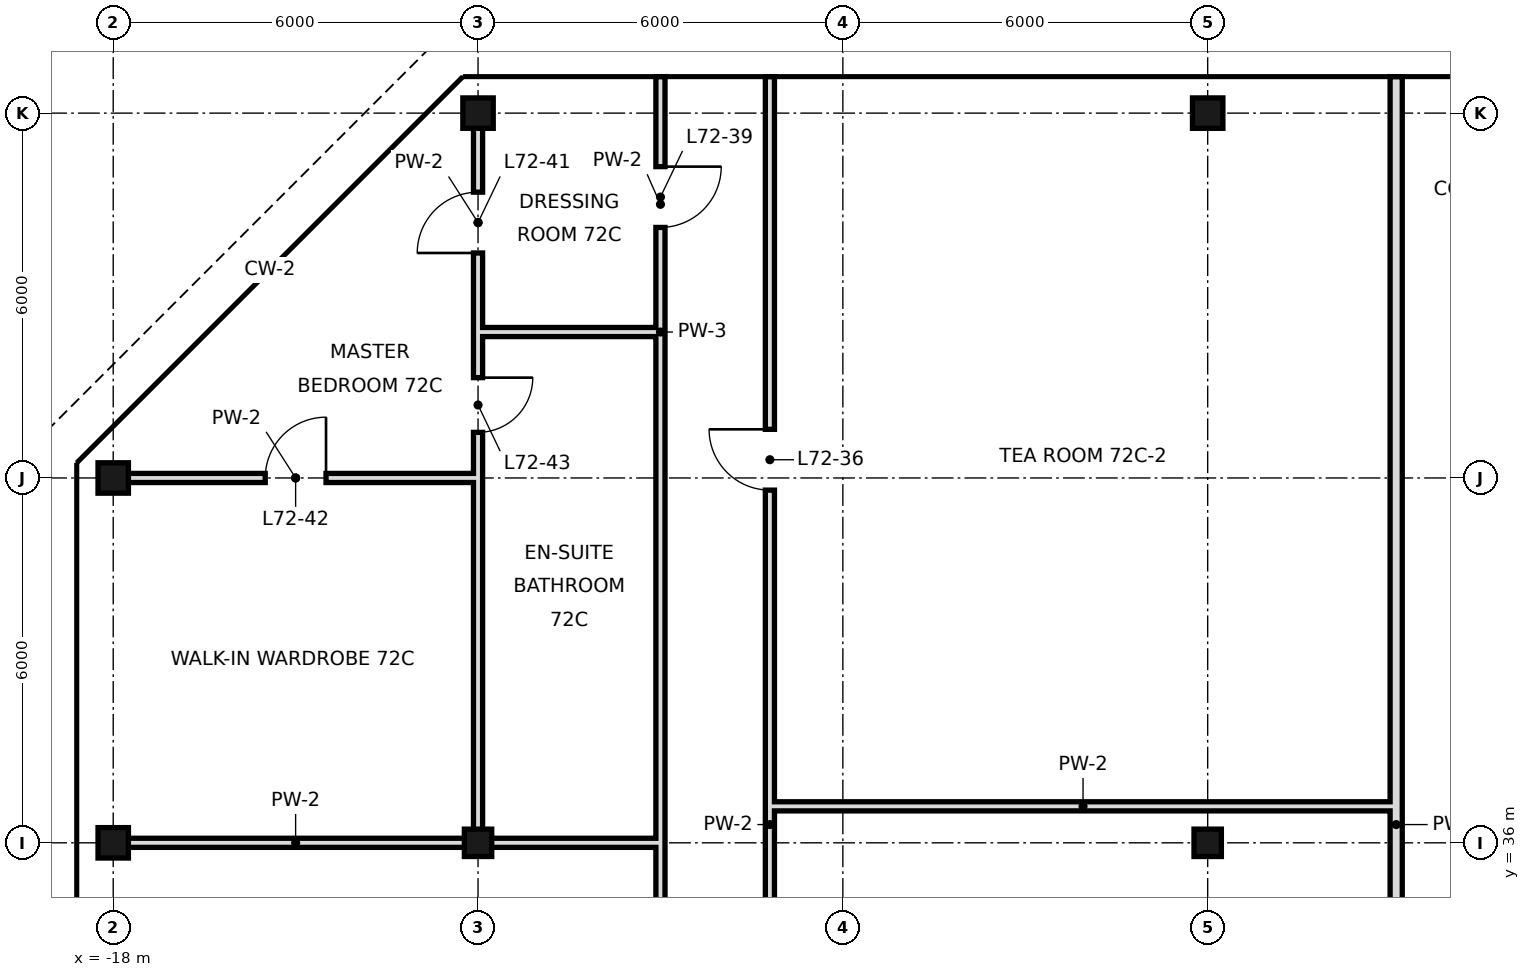
"""IFC4 building model, lengths in metres.
Left out: names, types, materials, properties, quantities, classifications, styles, units other than length and angle.
Written with IfcOpenShell. Run it as: python <this file> out.ifc"""

import sys

from ifc_helpers import new_model, si_unit, direction, frame, frame_2d, origin, origin_2d, place, context, subcontext, project, spatial, rectangle, hollow_rectangle, extrude, element, fill, save


model = new_model("IFC4")
c1 = context("Model", 3, precision=1e-05, world=origin(), true_north=direction((0.0, 1.0)))
c2 = subcontext(c1, "Body", "Model", "MODEL_VIEW")
j1 = project(units=[si_unit("LENGTHUNIT", "METRE"), si_unit("PLANEANGLEUNIT", "RADIAN")], contexts=[c1])
p1 = place(None, origin())
s1 = spatial("IfcSite", under=j1, at=p1, CompositionType="ELEMENT")
p2 = place(p1, origin())
s2 = spatial("IfcBuilding", under=s1, at=p2, CompositionType="ELEMENT")
p3 = place(p2, frame((0.0, 0.0, 305.2)))
s3 = spatial("IfcBuildingStorey", under=s2, at=p3, CompositionType="ELEMENT", Elevation=305.2)
for number, where, z_axis, x_axis in (
    (1, (-18.0, 36.0, 0.0), (0.0, 0.0, 1.0), (1.0, 0.0, 0.0)),
    (2, (-18.0, 42.0, 0.0), (0.0, 0.0, 1.0), (1.0, 0.0, 0.0)),
):
    element("IfcColumn", number, at=place(p3, frame(where, z_axis=z_axis, x_axis=x_axis)), inside=s3, PredefinedType="COLUMN", context=c2, shape_type="SweptSolid", body=[
        extrude(hollow_rectangle(XDim=0.5, YDim=0.5, WallThickness=0.025, at=origin_2d()), origin(), (0.0, 0.0, 1.0), 3.6),
    ])
p4 = place(p3, frame((-12.0, 36.0, 0.0), z_axis=(0.0, 0.0, 1.0), x_axis=(1.0, 0.0, 0.0)))
e3 = element("IfcColumn", 3, at=p4, inside=s3, PredefinedType="COLUMN", context=c2, shape_type="SweptSolid", body=[
    extrude(hollow_rectangle(XDim=0.45, YDim=0.45, WallThickness=0.022, at=origin_2d()), origin(), (0.0, 0.0, 1.0), 3.6),
])
p5 = place(p3, frame((-12.0, 48.0, 0.0), z_axis=(0.0, 0.0, 1.0), x_axis=(1.0, 0.0, 0.0)))
e4 = element("IfcColumn", 4, at=p5, inside=s3, PredefinedType="COLUMN", context=c2, shape_type="SweptSolid", body=[
    extrude(hollow_rectangle(XDim=0.5, YDim=0.5, WallThickness=0.025, at=origin_2d()), origin(), (0.0, 0.0, 1.0), 3.6),
])
p6 = place(p3, frame((0.0, 36.0, 0.0), z_axis=(0.0, 0.0, 1.0), x_axis=(1.0, 0.0, 0.0)))
e5 = element("IfcColumn", 5, at=p6, inside=s3, PredefinedType="COLUMN", context=c2, shape_type="SweptSolid", body=[
    extrude(hollow_rectangle(XDim=0.45, YDim=0.45, WallThickness=0.022, at=origin_2d()), origin(), (0.0, 0.0, 1.0), 3.6),
])
p7 = place(p3, frame((0.0, 48.0, 0.0), z_axis=(0.0, 0.0, 1.0), x_axis=(1.0, 0.0, 0.0)))
e6 = element("IfcColumn", 6, at=p7, inside=s3, PredefinedType="COLUMN", context=c2, shape_type="SweptSolid", body=[
    extrude(hollow_rectangle(XDim=0.5, YDim=0.5, WallThickness=0.025, at=origin_2d()), origin(), (0.0, 0.0, 1.0), 3.6),
])
p8 = place(p3, frame((-12.0, 44.4, 0.0), z_axis=(0.0, 0.0, 1.0), x_axis=(0.0, 1.0, 0.0)))
e7 = element("IfcWall", 7, at=p8, inside=s3, PredefinedType="PARTITIONING", context=c2, shape_type="SweptSolid", body=[
    extrude(rectangle(XDim=3.6, YDim=0.15, at=frame_2d((1.8, 0.0))), origin(), (0.0, 0.0, 1.0), 2.72),
])
p9 = place(p8, frame((1.3, 0.0, 0.0)))
e8 = element("IfcOpeningElement", 8, at=p9, cuts=e7, PredefinedType="OPENING", context=c2, shape_type="SweptSolid", body=[
    extrude(rectangle(XDim=1.0, YDim=2.4, at=frame_2d((0.5, 1.2))), frame((0.0, 0.085, 0.0), z_axis=(0.0, -1.0, 0.0), x_axis=(1.0, 0.0, 0.0)), (0.0, 0.0, 1.0), 0.17),
])
p10 = place(p3, frame((-12.0, 36.0, 0.0), z_axis=(0.0, 0.0, 1.0), x_axis=(0.0, 1.0, 0.0)))
e9 = element("IfcWall", 9, at=p10, inside=s3, PredefinedType="PARTITIONING", context=c2, shape_type="SweptSolid", body=[
    extrude(rectangle(XDim=8.4, YDim=0.15, at=frame_2d((4.2, 0.0))), origin(), (0.0, 0.0, 1.0), 2.72),
])
p11 = place(p10, frame((6.75, 0.0, 0.0)))
e10 = element("IfcOpeningElement", 10, at=p11, cuts=e9, PredefinedType="OPENING", context=c2, shape_type="SweptSolid", body=[
    extrude(rectangle(XDim=0.9, YDim=2.4, at=frame_2d((0.45, 1.2))), frame((0.0, 0.085, 0.0), z_axis=(0.0, -1.0, 0.0), x_axis=(1.0, 0.0, 0.0)), (0.0, 0.0, 1.0), 0.17),
])
p12 = place(p3, frame((-7.2, 24.0, 0.0), z_axis=(0.0, 0.0, 1.0), x_axis=(0.0, 1.0, 0.0)))
e11 = element("IfcWall", 11, at=p12, inside=s3, PredefinedType="PARTITIONING", context=c2, shape_type="SweptSolid", body=[
    extrude(rectangle(XDim=24.6, YDim=0.15, at=frame_2d((12.3, 0.0))), origin(), (0.0, 0.0, 1.0), 3.42),
])
p13 = place(p12, frame((1.3, 0.0, 0.0)))
e12 = element("IfcOpeningElement", 12, at=p13, cuts=e11, PredefinedType="OPENING", context=c2, shape_type="SweptSolid", body=[
    extrude(rectangle(XDim=1.0, YDim=2.4, at=frame_2d((0.5, 1.2))), frame((0.0, 0.085, 0.0), z_axis=(0.0, -1.0, 0.0), x_axis=(1.0, 0.0, 0.0)), (0.0, 0.0, 1.0), 0.17),
])
p14 = place(p12, frame((7.6, 0.0, 0.0)))
e13 = element("IfcOpeningElement", 13, at=p14, cuts=e11, PredefinedType="OPENING", context=c2, shape_type="SweptSolid", body=[
    extrude(rectangle(XDim=1.0, YDim=2.4, at=frame_2d((0.5, 1.2))), frame((0.0, 0.085, 0.0), z_axis=(0.0, -1.0, 0.0), x_axis=(1.0, 0.0, 0.0)), (0.0, 0.0, 1.0), 0.17),
])
p15 = place(p12, frame((17.8, 0.0, 0.0)))
e14 = element("IfcOpeningElement", 14, at=p15, cuts=e11, PredefinedType="OPENING", context=c2, shape_type="SweptSolid", body=[
    extrude(rectangle(XDim=1.0, YDim=2.4, at=frame_2d((0.5, 1.2))), frame((0.0, 0.085, 0.0), z_axis=(0.0, -1.0, 0.0), x_axis=(1.0, 0.0, 0.0)), (0.0, 0.0, 1.0), 0.17),
])
p16 = place(p3, frame((-9.0, 18.0, 0.0), z_axis=(0.0, 0.0, 1.0), x_axis=(0.0, 1.0, 0.0)))
e15 = element("IfcWall", 15, at=p16, inside=s3, PredefinedType="PARTITIONING", context=c2, shape_type="SweptSolid", body=[
    extrude(rectangle(XDim=18.0, YDim=0.15, at=frame_2d((9.0, 0.0))), origin(), (0.0, 0.0, 1.0), 3.42),
])
p17 = place(p16, frame((3.16, 0.0, 0.0)))
e16 = element("IfcOpeningElement", 16, at=p17, cuts=e15, PredefinedType="OPENING", context=c2, shape_type="SweptSolid", body=[
    extrude(rectangle(XDim=1.8, YDim=2.4, at=frame_2d((0.9, 1.2))), frame((0.0, 0.085, 0.0), z_axis=(0.0, -1.0, 0.0), x_axis=(1.0, 0.0, 0.0)), (0.0, 0.0, 1.0), 0.17),
])
p18 = place(p16, frame((13.6, 0.0, 0.0)))
e17 = element("IfcOpeningElement", 17, at=p18, cuts=e15, PredefinedType="OPENING", context=c2, shape_type="SweptSolid", body=[
    extrude(rectangle(XDim=1.0, YDim=2.4, at=frame_2d((0.5, 1.2))), frame((0.0, 0.085, 0.0), z_axis=(0.0, -1.0, 0.0), x_axis=(1.0, 0.0, 0.0)), (0.0, 0.0, 1.0), 0.17),
])
p19 = place(p3, frame((-9.0, 44.4, 0.0), z_axis=(0.0, 0.0, 1.0), x_axis=(0.0, 1.0, 0.0)))
e18 = element("IfcWall", 18, at=p19, inside=s3, PredefinedType="PARTITIONING", context=c2, shape_type="SweptSolid", body=[
    extrude(rectangle(XDim=4.2, YDim=0.15, at=frame_2d((2.1, 0.0))), origin(), (0.0, 0.0, 1.0), 3.42),
])
p20 = place(p19, frame((1.72, 0.0, 0.0)))
e19 = element("IfcOpeningElement", 19, at=p20, cuts=e18, PredefinedType="OPENING", context=c2, shape_type="SweptSolid", body=[
    extrude(rectangle(XDim=1.0, YDim=2.4, at=frame_2d((0.5, 1.2))), frame((0.0, 0.085, 0.0), z_axis=(0.0, -1.0, 0.0), x_axis=(1.0, 0.0, 0.0)), (0.0, 0.0, 1.0), 0.17),
])
p21 = place(p3, frame((-9.0, 36.0, 0.0), z_axis=(0.0, 0.0, 1.0), x_axis=(0.0, 1.0, 0.0)))
e20 = element("IfcWall", 20, at=p21, inside=s3, PredefinedType="PARTITIONING", context=c2, shape_type="SweptSolid", body=[
    extrude(rectangle(XDim=8.4, YDim=0.15, at=frame_2d((4.2, 0.0))), origin(), (0.0, 0.0, 1.0), 3.42),
])
p22 = place(p3, frame((3.1, 24.0, 0.0), z_axis=(0.0, 0.0, 1.0), x_axis=(0.0, 1.0, 0.0)))
e21 = element("IfcWall", 21, at=p22, inside=s3, PredefinedType="SOLIDWALL", context=c2, shape_type="SweptSolid", body=[
    extrude(rectangle(XDim=24.6, YDim=0.2, at=frame_2d((12.3, 0.0))), origin(), (0.0, 0.0, 1.0), 2.72),
])
p23 = place(p22, frame((1.58, 0.0, 0.0)))
e22 = element("IfcOpeningElement", 22, at=p23, cuts=e21, PredefinedType="OPENING", context=c2, shape_type="SweptSolid", body=[
    extrude(rectangle(XDim=1.2, YDim=2.4, at=frame_2d((0.6, 1.2))), frame((0.0, 0.11, 0.0), z_axis=(0.0, -1.0, 0.0), x_axis=(1.0, 0.0, 0.0)), (0.0, 0.0, 1.0), 0.22),
])
p24 = place(p3, frame((-18.0, 36.0, 0.0), z_axis=(0.0, 0.0, 1.0), x_axis=(1.0, 0.0, 0.0)))
e23 = element("IfcWall", 23, at=p24, inside=s3, PredefinedType="PARTITIONING", context=c2, shape_type="SweptSolid", body=[
    extrude(rectangle(XDim=6.0, YDim=0.15, at=frame_2d((3.0, 0.0))), origin(), (0.0, 0.0, 1.0), 2.97),
])
p25 = place(p3, frame((-12.0, 36.0, 0.0), z_axis=(0.0, 0.0, 1.0), x_axis=(1.0, 0.0, 0.0)))
e24 = element("IfcWall", 24, at=p25, inside=s3, PredefinedType="PARTITIONING", context=c2, shape_type="SweptSolid", body=[
    extrude(rectangle(XDim=3.0, YDim=0.15, at=frame_2d((1.5, 0.0))), origin(), (0.0, 0.0, 1.0), 2.72),
])
p26 = place(p3, frame((-7.2, 36.6, 0.0), z_axis=(0.0, 0.0, 1.0), x_axis=(1.0, 0.0, 0.0)))
e25 = element("IfcWall", 25, at=p26, inside=s3, PredefinedType="PARTITIONING", context=c2, shape_type="SweptSolid", body=[
    extrude(rectangle(XDim=10.3, YDim=0.15, at=frame_2d((5.15, 0.0))), origin(), (0.0, 0.0, 1.0), 3.42),
])
p27 = place(p3, frame((-18.0, 42.0, 0.0), z_axis=(0.0, 0.0, 1.0), x_axis=(1.0, 0.0, 0.0)))
e26 = element("IfcWall", 26, at=p27, inside=s3, PredefinedType="PARTITIONING", context=c2, shape_type="SweptSolid", body=[
    extrude(rectangle(XDim=6.0, YDim=0.15, at=frame_2d((3.0, 0.0))), origin(), (0.0, 0.0, 1.0), 2.97),
])
p28 = place(p27, frame((2.5, 0.0, 0.0)))
e27 = element("IfcOpeningElement", 27, at=p28, cuts=e26, PredefinedType="OPENING", context=c2, shape_type="SweptSolid", body=[
    extrude(rectangle(XDim=1.0, YDim=2.4, at=frame_2d((0.5, 1.2))), frame((0.0, 0.085, 0.0), z_axis=(0.0, -1.0, 0.0), x_axis=(1.0, 0.0, 0.0)), (0.0, 0.0, 1.0), 0.17),
])
p29 = place(p3, frame((-12.0, 44.4, 0.0), z_axis=(0.0, 0.0, 1.0), x_axis=(1.0, 0.0, 0.0)))
e28 = element("IfcWall", 28, at=p29, inside=s3, PredefinedType="PARTITIONING", context=c2, shape_type="SweptSolid", body=[
    extrude(rectangle(XDim=3.0, YDim=0.15, at=frame_2d((1.5, 0.0))), origin(), (0.0, 0.0, 1.0), 3.42),
])
p30 = place(p15, frame((1.0, 0.0, 0.0), z_axis=(0.0, 0.0, 1.0), x_axis=(-1.0, 0.0, 0.0)))
e29 = element("IfcDoor", 29, at=p30, inside=s3, OperationType="SINGLE_SWING_LEFT", PredefinedType="DOOR", context=c2, shape_type="SweptSolid", body=[
    extrude(rectangle(XDim=1.0, YDim=2.4, at=frame_2d((0.5, 1.2))), frame((0.0, 0.025, 0.0), z_axis=(0.0, -1.0, 0.0), x_axis=(1.0, 0.0, 0.0)), (0.0, 0.0, 1.0), 0.05),
])
fill(e14, e29)
p31 = place(p20, origin())
e30 = element("IfcDoor", 30, at=p31, inside=s3, OperationType="SINGLE_SWING_RIGHT", PredefinedType="DOOR", context=c2, shape_type="SweptSolid", body=[
    extrude(rectangle(XDim=1.0, YDim=2.4, at=frame_2d((0.5, 1.2))), frame((0.0, 0.025, 0.0), z_axis=(0.0, -1.0, 0.0), x_axis=(1.0, 0.0, 0.0)), (0.0, 0.0, 1.0), 0.05),
])
fill(e19, e30)
p32 = place(p9, origin())
e31 = element("IfcDoor", 31, at=p32, inside=s3, OperationType="SINGLE_SWING_LEFT", PredefinedType="DOOR", context=c2, shape_type="SweptSolid", body=[
    extrude(rectangle(XDim=1.0, YDim=2.4, at=frame_2d((0.5, 1.2))), frame((0.0, 0.025, 0.0), z_axis=(0.0, -1.0, 0.0), x_axis=(1.0, 0.0, 0.0)), (0.0, 0.0, 1.0), 0.05),
])
fill(e8, e31)
p33 = place(p28, frame((1.0, 0.0, 0.0), z_axis=(0.0, 0.0, 1.0), x_axis=(-1.0, 0.0, 0.0)))
e32 = element("IfcDoor", 32, at=p33, inside=s3, OperationType="SINGLE_SWING_LEFT", PredefinedType="DOOR", context=c2, shape_type="SweptSolid", body=[
    extrude(rectangle(XDim=1.0, YDim=2.4, at=frame_2d((0.5, 1.2))), frame((0.0, 0.025, 0.0), z_axis=(0.0, -1.0, 0.0), x_axis=(1.0, 0.0, 0.0)), (0.0, 0.0, 1.0), 0.05),
])
fill(e27, e32)
p34 = place(p11, origin())
e33 = element("IfcDoor", 33, at=p34, inside=s3, OperationType="SINGLE_SWING_RIGHT", PredefinedType="DOOR", context=c2, shape_type="SweptSolid", body=[
    extrude(rectangle(XDim=0.9, YDim=2.4, at=frame_2d((0.45, 1.2))), frame((0.0, 0.025, 0.0), z_axis=(0.0, -1.0, 0.0), x_axis=(1.0, 0.0, 0.0)), (0.0, 0.0, 1.0), 0.05),
])
fill(e10, e33)
save(model, sys.argv[1])
